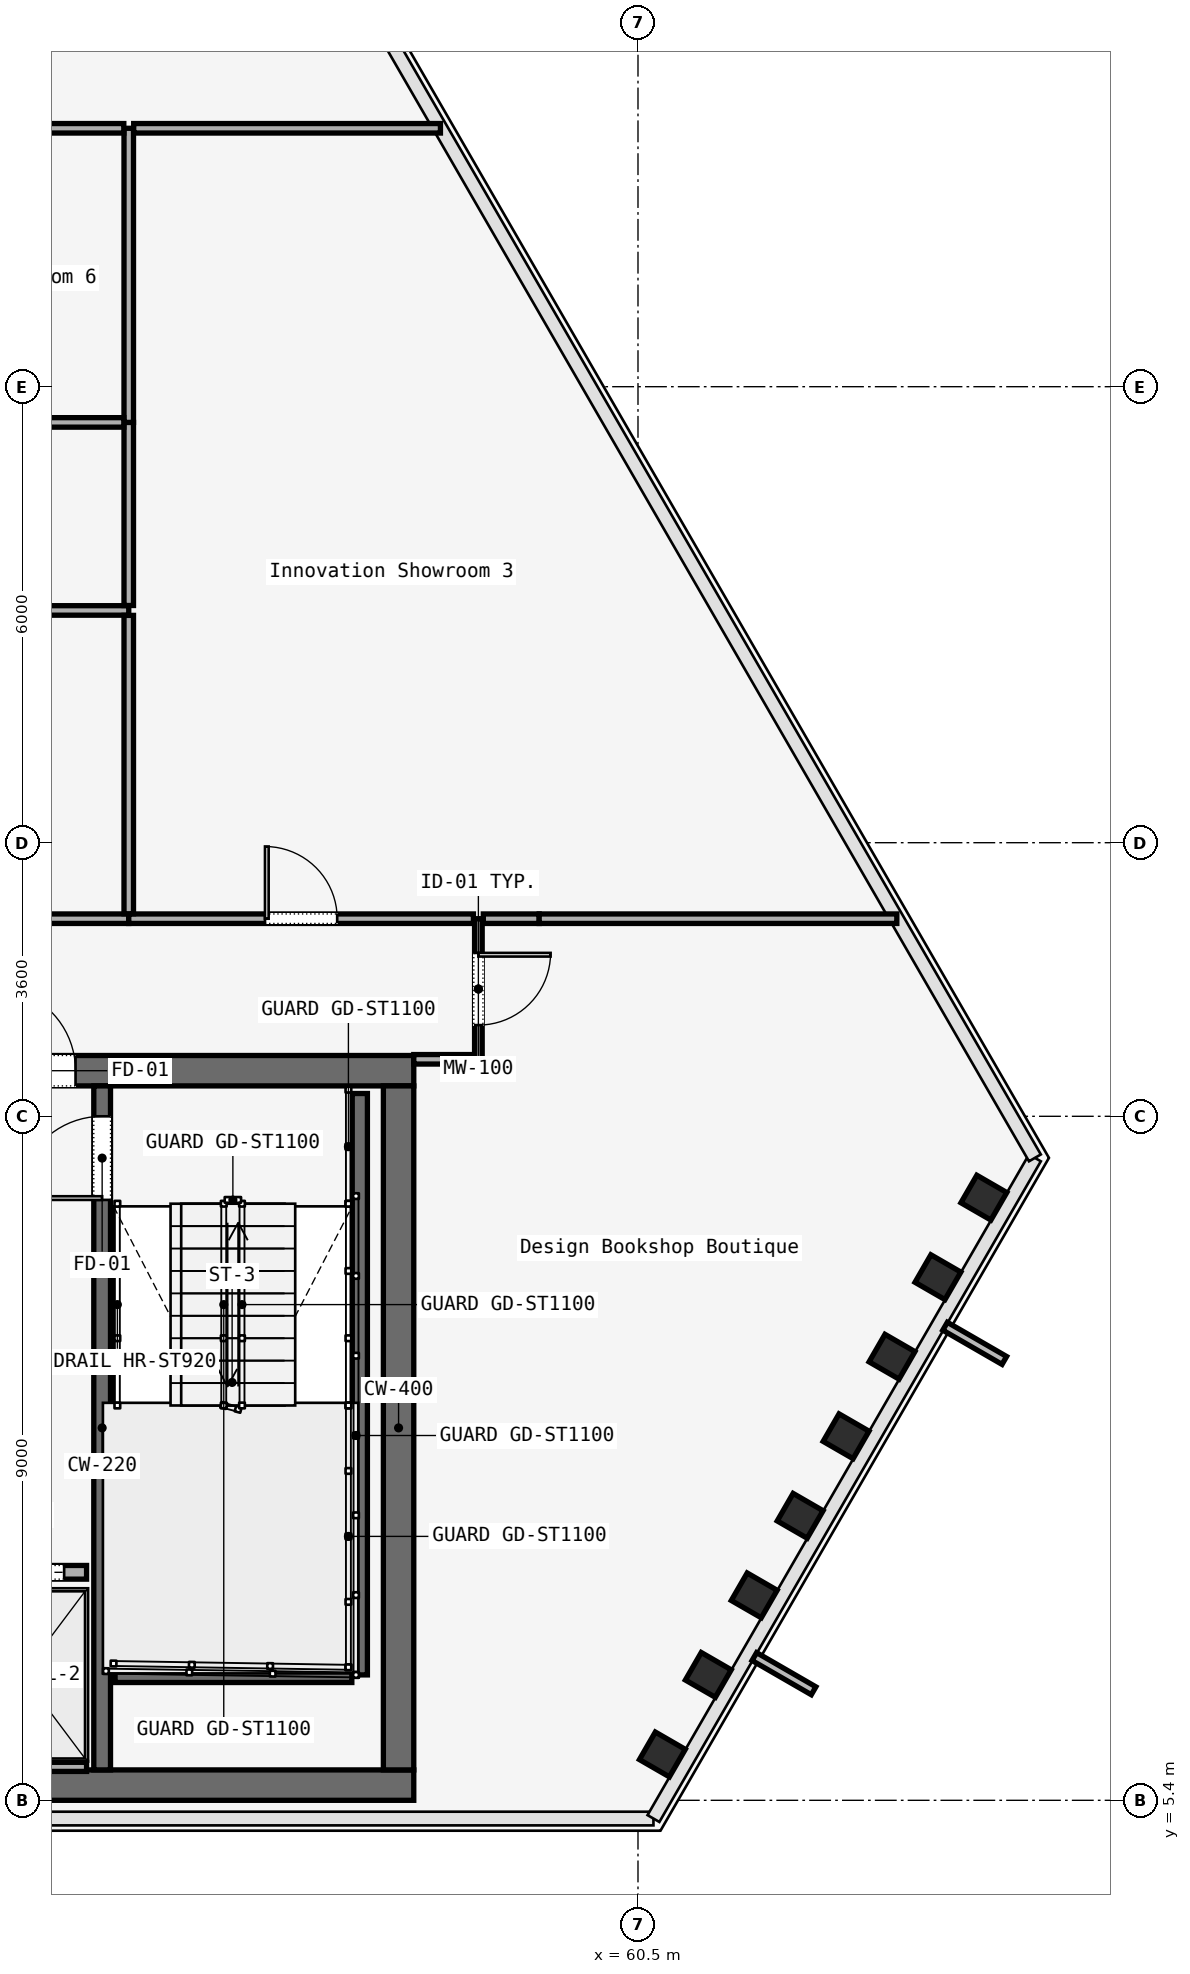
"""IFC4 building model, lengths in metres.
Left out: names, types, materials, properties, quantities, classifications, styles, units other than length and angle.
Written with IfcOpenShell. Run it as: python <this file> out.ifc"""

import sys

from ifc_helpers import new_model, si_unit, direction, frame, frame_2d, origin, origin_2d, place, context, subcontext, project, spatial, rectangle, i_section, extrude, element, fill, save


model = new_model("IFC4")
c1 = context("Model", 3, precision=1e-05, world=origin(), true_north=direction((0.0, 1.0)))
c2 = subcontext(c1, "Body", "Model", "MODEL_VIEW")
j1 = project(units=[si_unit("LENGTHUNIT", "METRE"), si_unit("PLANEANGLEUNIT", "RADIAN")], contexts=[c1])
p1 = place(None, origin())
s1 = spatial("IfcSite", under=j1, at=p1, CompositionType="ELEMENT")
p2 = place(p1, origin())
s2 = spatial("IfcBuilding", under=s1, at=p2, CompositionType="ELEMENT")
p3 = place(p2, frame((0.0, 0.0, 176.4)))
s3 = spatial("IfcBuildingStorey", under=s2, at=p3, CompositionType="ELEMENT", Elevation=176.4)
p4 = place(p3, frame((26.45, 15.0, 0.0), z_axis=(0.0, 0.0, 1.0), x_axis=(1.0, 0.0, 0.0)))
e1 = element("IfcWall", 1, at=p4, inside=s3, PredefinedType="SOLIDWALL", context=c2, shape_type="SweptSolid", body=[
    extrude(rectangle(XDim=31.1, YDim=0.4, at=frame_2d((15.55, 0.0))), origin(), (0.0, 0.0, 1.0), 3.58),
])
p5 = place(p4, frame((1.65, 0.0, 0.0)))
e2 = element("IfcOpeningElement", 2, at=p5, cuts=e1, PredefinedType="OPENING", context=c2, shape_type="SweptSolid", body=[
    extrude(rectangle(XDim=1.1, YDim=2.2, at=frame_2d((0.55, 1.1))), frame((0.0, 0.2, 0.0), z_axis=(0.0, -1.0, 0.0), x_axis=(1.0, 0.0, 0.0)), (0.0, 0.0, 1.0), 0.4),
])
p6 = place(p4, frame((13.65, 0.0, 0.0)))
e3 = element("IfcOpeningElement", 3, at=p6, cuts=e1, PredefinedType="OPENING", context=c2, shape_type="SweptSolid", body=[
    extrude(rectangle(XDim=1.1, YDim=2.2, at=frame_2d((0.55, 1.1))), frame((0.0, 0.2, 0.0), z_axis=(0.0, -1.0, 0.0), x_axis=(1.0, 0.0, 0.0)), (0.0, 0.0, 1.0), 0.4),
])
p7 = place(p4, frame((25.55, 0.0, 0.0)))
e4 = element("IfcOpeningElement", 4, at=p7, cuts=e1, PredefinedType="OPENING", context=c2, shape_type="SweptSolid", body=[
    extrude(rectangle(XDim=1.1, YDim=2.2, at=frame_2d((0.55, 1.1))), frame((0.0, 0.2, 0.0), z_axis=(0.0, -1.0, 0.0), x_axis=(1.0, 0.0, 0.0)), (0.0, 0.0, 1.0), 0.4),
])
p8 = place(p4, frame((10.7, 0.0, 0.0)))
e5 = element("IfcOpeningElement", 5, at=p8, cuts=e1, PredefinedType="OPENING", context=c2, shape_type="SweptSolid", body=[
    extrude(rectangle(XDim=1.4, YDim=2.2, at=frame_2d((0.7, 1.1))), frame((0.0, 0.2, 0.0), z_axis=(0.0, -1.0, 0.0), x_axis=(1.0, 0.0, 0.0)), (0.0, 0.0, 1.0), 0.4),
])
p9 = place(p4, frame((19.35, 0.0, 0.0)))
e6 = element("IfcOpeningElement", 6, at=p9, cuts=e1, PredefinedType="OPENING", context=c2, shape_type="SweptSolid", body=[
    extrude(rectangle(XDim=1.1, YDim=2.2, at=frame_2d((0.55, 1.1))), frame((0.0, 0.2, 0.0), z_axis=(0.0, -1.0, 0.0), x_axis=(1.0, 0.0, 0.0)), (0.0, 0.0, 1.0), 0.4),
])
p10 = place(p4, frame((21.4, 0.0, 0.0)))
e7 = element("IfcOpeningElement", 7, at=p10, cuts=e1, PredefinedType="OPENING", context=c2, shape_type="SweptSolid", body=[
    extrude(rectangle(XDim=0.9, YDim=2.1, at=frame_2d((0.45, 1.05))), frame((0.0, 0.2, 0.0), z_axis=(0.0, -1.0, 0.0), x_axis=(1.0, 0.0, 0.0)), (0.0, 0.0, 1.0), 0.4),
])
p11 = place(p4, frame((23.35, 0.0, 0.0)))
e8 = element("IfcOpeningElement", 8, at=p11, cuts=e1, PredefinedType="OPENING", context=c2, shape_type="SweptSolid", body=[
    extrude(rectangle(XDim=1.3, YDim=2.3, at=frame_2d((0.65, 1.15))), frame((0.0, 0.2, 0.0), z_axis=(0.0, -1.0, 0.0), x_axis=(1.0, 0.0, 0.0)), (0.0, 0.0, 1.0), 0.4),
])
p12 = place(p3, frame((26.45, 5.6, 0.0), z_axis=(0.0, 0.0, 1.0), x_axis=(1.0, 0.0, 0.0)))
e9 = element("IfcWall", 9, at=p12, inside=s3, PredefinedType="SOLIDWALL", context=c2, shape_type="SweptSolid", body=[
    extrude(rectangle(XDim=31.1, YDim=0.4, at=frame_2d((15.55, 0.0))), origin(), (0.0, 0.0, 1.0), 3.58),
])
p13 = place(p3, frame((57.35, 5.8, 0.0), z_axis=(0.0, 0.0, 1.0), x_axis=(0.0, 1.0, 0.0)))
e10 = element("IfcWall", 10, at=p13, inside=s3, PredefinedType="SOLIDWALL", context=c2, shape_type="SweptSolid", body=[
    extrude(rectangle(XDim=9.0, YDim=0.4, at=frame_2d((4.5, 0.0))), origin(), (0.0, 0.0, 1.0), 3.58),
])
p14 = place(p3, frame((53.45, 5.8, 0.0), z_axis=(0.0, 0.0, 1.0), x_axis=(0.0, 1.0, 0.0)))
e11 = element("IfcWall", 11, at=p14, inside=s3, PredefinedType="SOLIDWALL", context=c2, shape_type="SweptSolid", body=[
    extrude(rectangle(XDim=9.0, YDim=0.22, at=frame_2d((4.5, 0.0))), origin(), (0.0, 0.0, 1.0), 3.58),
])
p15 = place(p14, frame((7.5, 0.0, 0.0)))
e12 = element("IfcOpeningElement", 12, at=p15, cuts=e11, PredefinedType="OPENING", context=c2, shape_type="SweptSolid", body=[
    extrude(rectangle(XDim=1.1, YDim=2.2, at=frame_2d((0.55, 1.1))), frame((0.0, 0.11, 0.0), z_axis=(0.0, -1.0, 0.0), x_axis=(1.0, 0.0, 0.0)), (0.0, 0.0, 1.0), 0.22),
])
for number, where, z_axis, x_axis in (
    (13, (60.821, 6.003, 0.0), (0.0, 0.0, 1.0), (0.5, 0.866, 0.0)),
    (14, (61.425, 7.05, 0.0), (0.0, 0.0, 1.0), (0.5, 0.866, 0.0)),
    (15, (62.029, 8.096, 0.0), (0.0, 0.0, 1.0), (0.5, 0.866, 0.0)),
    (16, (62.634, 9.143, 0.0), (0.0, 0.0, 1.0), (0.5, 0.866, 0.0)),
    (17, (63.238, 10.19, 0.0), (0.0, 0.0, 1.0), (0.5, 0.866, 0.0)),
    (18, (63.842, 11.236, 0.0), (0.0, 0.0, 1.0), (0.5, 0.866, 0.0)),
    (19, (64.446, 12.283, 0.0), (0.0, 0.0, 1.0), (0.5, 0.866, 0.0)),
    (20, (65.051, 13.33, 0.0), (0.0, 0.0, 1.0), (0.5, 0.866, 0.0)),
):
    element("IfcColumn", number, at=place(p3, frame(where, z_axis=z_axis, x_axis=x_axis)), inside=s3, PredefinedType="COLUMN", context=c2, shape_type="SweptSolid", body=[
        extrude(i_section(OverallWidth=0.418, OverallDepth=0.455, WebThickness=0.042, FlangeThickness=0.052, FilletRadius=0.015, at=origin_2d()), origin(), (0.0, 0.0, 1.0), 3.58),
    ])
p16 = place(p3, frame((56.84, 14.7, 0.0), z_axis=(0.0, 0.0, 1.0), x_axis=(0.0, -1.0, 0.0)))
e21 = element("IfcWall", 21, at=p16, inside=s3, PredefinedType="SOLIDWALL", context=c2, shape_type="SweptSolid", body=[
    extrude(rectangle(XDim=7.65, YDim=0.2, at=frame_2d((3.825, 0.0))), origin(), (0.0, 0.0, 1.0), 3.8),
])
p17 = place(p3, frame((53.62, 7.05, 0.0), z_axis=(0.0, 0.0, 1.0), x_axis=(1.0, 0.0, 0.0)))
e22 = element("IfcWall", 22, at=p17, inside=s3, PredefinedType="SOLIDWALL", context=c2, shape_type="SweptSolid", body=[
    extrude(rectangle(XDim=3.115, YDim=0.2, at=frame_2d((1.558, 0.0))), origin(), (0.0, 0.0, 1.0), 3.8),
])
p18 = place(p3, frame((51.555, 8.4, 0.0), z_axis=(0.0, 0.0, 1.0), x_axis=(1.0, 0.0, 0.0)))
e23 = element("IfcWall", 23, at=p18, inside=s3, PredefinedType="SOLIDWALL", context=c2, shape_type="SweptSolid", body=[
    extrude(rectangle(XDim=1.69, YDim=0.18, at=frame_2d((0.845, 0.0))), origin(), (0.0, 0.0, 1.0), 3.01),
])
p19 = place(p18, frame((0.295, 0.0, 0.0)))
e24 = element("IfcOpeningElement", 24, at=p19, cuts=e23, PredefinedType="OPENING", context=c2, shape_type="SweptSolid", body=[
    extrude(rectangle(XDim=1.1, YDim=2.2, at=frame_2d((0.55, 1.1))), frame((0.0, 0.09, 0.0), z_axis=(0.0, -1.0, 0.0), x_axis=(1.0, 0.0, 0.0)), (0.0, 0.0, 1.0), 0.18),
])
p20 = place(p3, frame((51.555, 5.84, 0.0), z_axis=(0.0, 0.0, 1.0), x_axis=(1.0, 0.0, 0.0)))
e25 = element("IfcWall", 25, at=p20, inside=s3, PredefinedType="SOLIDWALL", context=c2, shape_type="SweptSolid", body=[
    extrude(rectangle(XDim=1.69, YDim=0.12, at=frame_2d((0.845, 0.0))), origin(), (0.0, 0.0, 1.0), 3.01),
])
p21 = place(p3, frame((58.4, 17.0, 0.0), z_axis=(0.0, 0.0, 1.0), x_axis=(0.0, -1.0, 0.0)))
e26 = element("IfcWall", 26, at=p21, inside=s3, PredefinedType="MOVABLE", context=c2, shape_type="SweptSolid", body=[
    extrude(rectangle(XDim=1.85, YDim=0.1, at=frame_2d((0.925, 0.0))), origin(), (0.0, 0.0, 1.0), 3.01),
])
p22 = place(p21, frame((0.45, 0.0, 0.0)))
e27 = element("IfcOpeningElement", 27, at=p22, cuts=e26, PredefinedType="OPENING", context=c2, shape_type="SweptSolid", body=[
    extrude(rectangle(XDim=0.95, YDim=2.2, at=frame_2d((0.475, 1.1))), frame((0.0, 0.05, 0.0), z_axis=(0.0, -1.0, 0.0), x_axis=(1.0, 0.0, 0.0)), (0.0, 0.0, 1.0), 0.1),
])
p23 = place(p3, frame((58.335, 15.15, 0.0), z_axis=(0.0, 0.0, 1.0), x_axis=(-1.0, 0.0, 0.0)))
e28 = element("IfcWall", 28, at=p23, inside=s3, PredefinedType="PARTITIONING", context=c2, shape_type="SweptSolid", body=[
    extrude(rectangle(XDim=0.785, YDim=0.125, at=frame_2d((0.393, 0.0))), origin(), (0.0, 0.0, 1.0), 3.01),
])
p24 = place(p3, frame((48.465, 17.0, 0.0), z_axis=(0.0, 0.0, 1.0), x_axis=(1.0, 0.0, 0.0)))
e29 = element("IfcWall", 29, at=p24, inside=s3, PredefinedType="PARTITIONING", context=c2, shape_type="SweptSolid", body=[
    extrude(rectangle(XDim=5.335, YDim=0.125, at=frame_2d((2.667, 0.0))), origin(), (0.0, 0.0, 1.0), 3.01),
])
p25 = place(p24, frame((1.968, 0.0, 0.0)))
e30 = element("IfcOpeningElement", 30, at=p25, cuts=e29, PredefinedType="OPENING", context=c2, shape_type="SweptSolid", body=[
    extrude(rectangle(XDim=1.4, YDim=2.2, at=frame_2d((0.7, 1.1))), frame((0.0, 0.062, 0.0), z_axis=(0.0, -1.0, 0.0), x_axis=(1.0, 0.0, 0.0)), (0.0, 0.0, 1.0), 0.125),
])
p26 = place(p3, frame((53.8, 17.0, 0.0), z_axis=(0.0, 0.0, 1.0), x_axis=(1.0, 0.0, 0.0)))
e31 = element("IfcWall", 31, at=p26, inside=s3, PredefinedType="PARTITIONING", context=c2, shape_type="SweptSolid", body=[
    extrude(rectangle(XDim=4.535, YDim=0.125, at=frame_2d((2.268, 0.0))), origin(), (0.0, 0.0, 1.0), 3.01),
])
p27 = place(p26, frame((1.792, 0.0, 0.0)))
e32 = element("IfcOpeningElement", 32, at=p27, cuts=e31, PredefinedType="OPENING", context=c2, shape_type="SweptSolid", body=[
    extrude(rectangle(XDim=0.95, YDim=2.2, at=frame_2d((0.475, 1.1))), frame((0.0, 0.062, 0.0), z_axis=(0.0, -1.0, 0.0), x_axis=(1.0, 0.0, 0.0)), (0.0, 0.0, 1.0), 0.125),
])
p28 = place(p3, frame((58.465, 17.0, 0.0), z_axis=(0.0, 0.0, 1.0), x_axis=(1.0, 0.0, 0.0)))
e33 = element("IfcWall", 33, at=p28, inside=s3, PredefinedType="PARTITIONING", context=c2, shape_type="SweptSolid", body=[
    extrude(rectangle(XDim=0.735, YDim=0.125, at=frame_2d((0.367, 0.0))), origin(), (0.0, 0.0, 1.0), 3.01),
])
p29 = place(p3, frame((59.2, 17.0, 0.0), z_axis=(0.0, 0.0, 1.0), x_axis=(1.0, 0.0, 0.0)))
e34 = element("IfcWall", 34, at=p29, inside=s3, PredefinedType="PARTITIONING", context=c2, shape_type="SweptSolid", body=[
    extrude(rectangle(XDim=4.705, YDim=0.125, at=frame_2d((2.353, 0.0))), origin(), (0.0, 0.0, 1.0), 3.01),
])
p30 = place(p3, frame((48.465, 21.056, 0.0), z_axis=(0.0, 0.0, 1.0), x_axis=(1.0, 0.0, 0.0)))
e35 = element("IfcWall", 35, at=p30, inside=s3, PredefinedType="PARTITIONING", context=c2, shape_type="SweptSolid", body=[
    extrude(rectangle(XDim=5.335, YDim=0.125, at=frame_2d((2.667, 0.0))), origin(), (0.0, 0.0, 1.0), 3.01),
])
p31 = place(p3, frame((53.8, 20.991, 0.0), z_axis=(0.0, 0.0, 1.0), x_axis=(0.0, -1.0, 0.0)))
e36 = element("IfcWall", 36, at=p31, inside=s3, PredefinedType="PARTITIONING", context=c2, shape_type="SweptSolid", body=[
    extrude(rectangle(XDim=3.926, YDim=0.125, at=frame_2d((1.963, 0.0))), origin(), (0.0, 0.0, 1.0), 3.01),
])
p32 = place(p3, frame((53.8, 21.121, 0.0), z_axis=(0.0, 0.0, 1.0), x_axis=(0.0, 1.0, 0.0)))
e37 = element("IfcWall", 37, at=p32, inside=s3, PredefinedType="PARTITIONING", context=c2, shape_type="SweptSolid", body=[
    extrude(rectangle(XDim=2.409, YDim=0.125, at=frame_2d((1.205, 0.0))), origin(), (0.0, 0.0, 1.0), 3.01),
])
p33 = place(p3, frame((53.8, 23.53, 0.0), z_axis=(0.0, 0.0, 1.0), x_axis=(0.0, 1.0, 0.0)))
e38 = element("IfcWall", 38, at=p33, inside=s3, PredefinedType="PARTITIONING", context=c2, shape_type="SweptSolid", body=[
    extrude(rectangle(XDim=3.87, YDim=0.125, at=frame_2d((1.935, 0.0))), origin(), (0.0, 0.0, 1.0), 3.01),
])
p34 = place(p3, frame((53.865, 27.4, 0.0), z_axis=(0.0, 0.0, 1.0), x_axis=(1.0, 0.0, 0.0)))
e39 = element("IfcWall", 39, at=p34, inside=s3, PredefinedType="PARTITIONING", context=c2, shape_type="SweptSolid", body=[
    extrude(rectangle(XDim=4.036, YDim=0.125, at=frame_2d((2.018, 0.0))), origin(), (0.0, 0.0, 1.0), 3.01),
])
p35 = place(p3, frame((48.465, 23.53, 0.0), z_axis=(0.0, 0.0, 1.0), x_axis=(1.0, 0.0, 0.0)))
e40 = element("IfcWall", 40, at=p35, inside=s3, PredefinedType="PARTITIONING", context=c2, shape_type="SweptSolid", body=[
    extrude(rectangle(XDim=5.27, YDim=0.125, at=frame_2d((2.635, 0.0))), origin(), (0.0, 0.0, 1.0), 3.01),
])
p36 = place(p3, frame((48.4, 27.4, 0.0), z_axis=(0.0, 0.0, 1.0), x_axis=(1.0, 0.0, 0.0)))
e41 = element("IfcWall", 41, at=p36, inside=s3, PredefinedType="PARTITIONING", context=c2, shape_type="SweptSolid", body=[
    extrude(rectangle(XDim=5.335, YDim=0.125, at=frame_2d((2.667, 0.0))), origin(), (0.0, 0.0, 1.0), 3.01),
])
p37 = place(p7, origin())
e42 = element("IfcDoor", 42, at=p37, inside=s3, OperationType="SINGLE_SWING_RIGHT", PredefinedType="DOOR", context=c2, shape_type="SweptSolid", body=[
    extrude(rectangle(XDim=1.1, YDim=2.2, at=frame_2d((0.55, 1.1))), frame((0.0, 0.025, 0.0), z_axis=(0.0, -1.0, 0.0), x_axis=(1.0, 0.0, 0.0)), (0.0, 0.0, 1.0), 0.05),
])
fill(e4, e42)
p38 = place(p15, origin())
e43 = element("IfcDoor", 43, at=p38, inside=s3, OperationType="SINGLE_SWING_LEFT", PredefinedType="DOOR", context=c2, shape_type="SweptSolid", body=[
    extrude(rectangle(XDim=1.1, YDim=2.2, at=frame_2d((0.55, 1.1))), frame((0.0, 0.025, 0.0), z_axis=(0.0, -1.0, 0.0), x_axis=(1.0, 0.0, 0.0)), (0.0, 0.0, 1.0), 0.05),
])
fill(e12, e43)
p39 = place(p19, origin())
e44 = element("IfcDoor", 44, at=p39, inside=s3, OperationType="SLIDING_TO_LEFT", PredefinedType="DOOR", context=c2, shape_type="SweptSolid", body=[
    extrude(rectangle(XDim=1.1, YDim=2.2, at=frame_2d((0.55, 1.1))), frame((0.0, 0.025, 0.0), z_axis=(0.0, -1.0, 0.0), x_axis=(1.0, 0.0, 0.0)), (0.0, 0.0, 1.0), 0.05),
])
fill(e24, e44)
p40 = place(p22, origin())
e45 = element("IfcDoor", 45, at=p40, inside=s3, OperationType="SINGLE_SWING_RIGHT", PredefinedType="DOOR", context=c2, shape_type="SweptSolid", body=[
    extrude(rectangle(XDim=0.95, YDim=2.2, at=frame_2d((0.475, 1.1))), frame((0.0, 0.025, 0.0), z_axis=(0.0, -1.0, 0.0), x_axis=(1.0, 0.0, 0.0)), (0.0, 0.0, 1.0), 0.05),
])
fill(e27, e45)
p41 = place(p27, origin())
e46 = element("IfcDoor", 46, at=p41, inside=s3, OperationType="SINGLE_SWING_LEFT", PredefinedType="DOOR", context=c2, shape_type="SweptSolid", body=[
    extrude(rectangle(XDim=0.95, YDim=2.2, at=frame_2d((0.475, 1.1))), frame((0.0, 0.025, 0.0), z_axis=(0.0, -1.0, 0.0), x_axis=(1.0, 0.0, 0.0)), (0.0, 0.0, 1.0), 0.05),
])
fill(e32, e46)
save(model, sys.argv[1])
